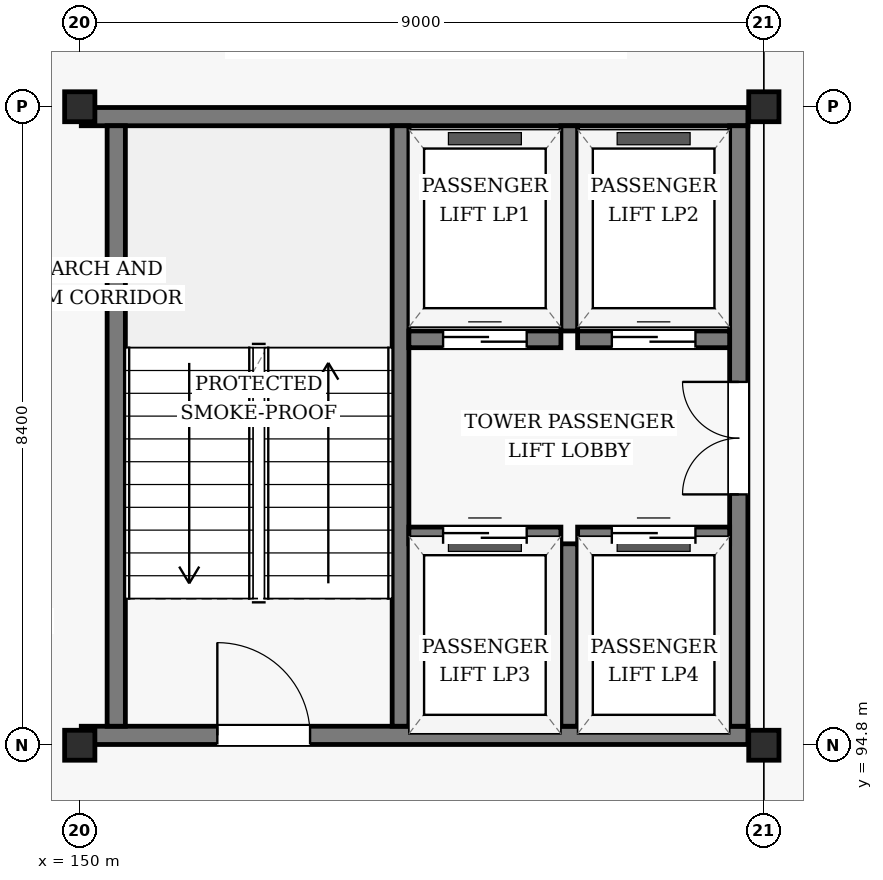
"""IFC4 building model, lengths in metres.
Left out: names, types, materials, properties, quantities, classifications, styles, units other than length and angle.
Written with IfcOpenShell. Run it as: python <this file> out.ifc"""

import sys

from ifc_helpers import new_model, si_unit, direction, frame, frame_2d, origin, origin_2d, place, context, subcontext, project, spatial, rectangle, i_section, extrude, element, fill, save


model = new_model("IFC4")
c1 = context("Model", 3, precision=1e-05, world=origin(), true_north=direction((0.0, 1.0)))
c2 = subcontext(c1, "Body", "Model", "MODEL_VIEW")
j1 = project(units=[si_unit("LENGTHUNIT", "METRE"), si_unit("PLANEANGLEUNIT", "RADIAN")], contexts=[c1])
p1 = place(None, origin())
s1 = spatial("IfcSite", under=j1, at=p1, CompositionType="ELEMENT")
p2 = place(p1, origin())
s2 = spatial("IfcBuilding", under=s1, at=p2, CompositionType="ELEMENT")
p3 = place(p2, frame((0.0, 0.0, 28.2)))
s3 = spatial("IfcBuildingStorey", under=s2, at=p3, CompositionType="ELEMENT", Elevation=28.2)
for number, where, z_axis, x_axis in (
    (1, (150.0, 94.8, 0.0), (0.0, 0.0, 1.0), (1.0, 0.0, 0.0)),
    (2, (150.0, 103.2, 0.0), (0.0, 0.0, 1.0), (1.0, 0.0, 0.0)),
    (3, (159.0, 94.8, 0.0), (0.0, 0.0, 1.0), (1.0, 0.0, 0.0)),
    (4, (159.0, 103.2, 0.0), (0.0, 0.0, 1.0), (1.0, 0.0, 0.0)),
):
    element("IfcColumn", number, at=place(p3, frame(where, z_axis=z_axis, x_axis=x_axis)), inside=s3, PredefinedType="COLUMN", context=c2, shape_type="SweptSolid", body=[
        extrude(i_section(OverallWidth=0.398, OverallDepth=0.394, WebThickness=0.011, FlangeThickness=0.018, FilletRadius=0.022, at=origin_2d()), origin(), (0.0, 0.0, 1.0), 3.6),
    ])
p4 = place(p3, frame((150.02, 94.93, 0.0), z_axis=(0.0, 0.0, 1.0), x_axis=(1.0, 0.0, 0.0)))
e5 = element("IfcWall", 5, at=p4, inside=s3, PredefinedType="SHEAR", context=c2, shape_type="SweptSolid", body=[
    extrude(rectangle(XDim=8.77, YDim=0.24, at=frame_2d((4.385, 0.0))), origin(), (0.0, 0.0, 1.0), 3.352),
])
p5 = place(p4, frame((1.79, 0.0, 0.0)))
e6 = element("IfcOpeningElement", 6, at=p5, cuts=e5, PredefinedType="OPENING", context=c2, shape_type="SweptSolid", body=[
    extrude(rectangle(XDim=1.22, YDim=2.18, at=frame_2d((0.61, 1.09))), frame((0.0, 0.13, 0.0), z_axis=(0.0, -1.0, 0.0), x_axis=(1.0, 0.0, 0.0)), (0.0, 0.0, 1.0), 0.26),
])
p6 = place(p3, frame((150.02, 103.07, 0.0), z_axis=(0.0, 0.0, 1.0), x_axis=(1.0, 0.0, 0.0)))
e7 = element("IfcWall", 7, at=p6, inside=s3, PredefinedType="SHEAR", context=c2, shape_type="SweptSolid", body=[
    extrude(rectangle(XDim=8.77, YDim=0.24, at=frame_2d((4.385, 0.0))), origin(), (0.0, 0.0, 1.0), 3.352),
])
p7 = place(p3, frame((150.48, 95.05, 0.0), z_axis=(0.0, 0.0, 1.0), x_axis=(0.0, 1.0, 0.0)))
e8 = element("IfcWall", 8, at=p7, inside=s3, PredefinedType="SHEAR", context=c2, shape_type="SweptSolid", body=[
    extrude(rectangle(XDim=7.9, YDim=0.24, at=frame_2d((3.95, 0.0))), origin(), (0.0, 0.0, 1.0), 3.352),
])
p8 = place(p3, frame((154.22, 95.05, 0.0), z_axis=(0.0, 0.0, 1.0), x_axis=(0.0, 1.0, 0.0)))
e9 = element("IfcWall", 9, at=p8, inside=s3, PredefinedType="SHEAR", context=c2, shape_type="SweptSolid", body=[
    extrude(rectangle(XDim=7.9, YDim=0.22, at=frame_2d((3.95, 0.0))), origin(), (0.0, 0.0, 1.0), 3.352),
])
p9 = place(p3, frame((158.67, 95.05, 0.0), z_axis=(0.0, 0.0, 1.0), x_axis=(0.0, 1.0, 0.0)))
e10 = element("IfcWall", 10, at=p9, inside=s3, PredefinedType="SHEAR", context=c2, shape_type="SweptSolid", body=[
    extrude(rectangle(XDim=7.9, YDim=0.24, at=frame_2d((3.95, 0.0))), origin(), (0.0, 0.0, 1.0), 3.352),
])
p10 = place(p9, frame((3.05, 0.0, 0.0)))
e11 = element("IfcOpeningElement", 11, at=p10, cuts=e10, PredefinedType="OPENING", context=c2, shape_type="SweptSolid", body=[
    extrude(rectangle(XDim=1.48, YDim=2.22, at=frame_2d((0.74, 1.11))), frame((0.0, 0.13, 0.0), z_axis=(0.0, -1.0, 0.0), x_axis=(1.0, 0.0, 0.0)), (0.0, 0.0, 1.0), 0.26),
])
p11 = place(p3, frame((156.44, 100.25, 0.0), z_axis=(0.0, 0.0, 1.0), x_axis=(0.0, 1.0, 0.0)))
e12 = element("IfcWall", 12, at=p11, inside=s3, PredefinedType="SHEAR", context=c2, shape_type="SweptSolid", body=[
    extrude(rectangle(XDim=2.7, YDim=0.22, at=frame_2d((1.35, 0.0))), origin(), (0.0, 0.0, 1.0), 3.352),
])
p12 = place(p3, frame((154.33, 100.14, 0.0), z_axis=(0.0, 0.0, 1.0), x_axis=(1.0, 0.0, 0.0)))
e13 = element("IfcWall", 13, at=p12, inside=s3, PredefinedType="SHEAR", context=c2, shape_type="SweptSolid", body=[
    extrude(rectangle(XDim=2.0, YDim=0.22, at=frame_2d((1.0, 0.0))), origin(), (0.0, 0.0, 1.0), 3.352),
])
p13 = place(p12, frame((0.45, 0.0, 0.0)))
e14 = element("IfcOpeningElement", 14, at=p13, cuts=e13, PredefinedType="OPENING", context=c2, shape_type="SweptSolid", body=[
    extrude(rectangle(XDim=1.1, YDim=2.15, at=frame_2d((0.55, 1.075))), frame((0.0, 0.12, 0.0), z_axis=(0.0, -1.0, 0.0), x_axis=(1.0, 0.0, 0.0)), (0.0, 0.0, 1.0), 0.24),
])
p14 = place(p3, frame((156.55, 100.14, 0.0), z_axis=(0.0, 0.0, 1.0), x_axis=(1.0, 0.0, 0.0)))
e15 = element("IfcWall", 15, at=p14, inside=s3, PredefinedType="SHEAR", context=c2, shape_type="SweptSolid", body=[
    extrude(rectangle(XDim=2.0, YDim=0.22, at=frame_2d((1.0, 0.0))), origin(), (0.0, 0.0, 1.0), 3.352),
])
p15 = place(p14, frame((0.45, 0.0, 0.0)))
e16 = element("IfcOpeningElement", 16, at=p15, cuts=e15, PredefinedType="OPENING", context=c2, shape_type="SweptSolid", body=[
    extrude(rectangle(XDim=1.1, YDim=2.15, at=frame_2d((0.55, 1.075))), frame((0.0, 0.12, 0.0), z_axis=(0.0, -1.0, 0.0), x_axis=(1.0, 0.0, 0.0)), (0.0, 0.0, 1.0), 0.24),
])
p16 = place(p3, frame((156.44, 95.05, 0.0), z_axis=(0.0, 0.0, 1.0), x_axis=(0.0, 1.0, 0.0)))
e17 = element("IfcWall", 17, at=p16, inside=s3, PredefinedType="SHEAR", context=c2, shape_type="SweptSolid", body=[
    extrude(rectangle(XDim=2.4, YDim=0.22, at=frame_2d((1.2, 0.0))), origin(), (0.0, 0.0, 1.0), 3.352),
])
p17 = place(p3, frame((154.33, 97.56, 0.0), z_axis=(0.0, 0.0, 1.0), x_axis=(1.0, 0.0, 0.0)))
e18 = element("IfcWall", 18, at=p17, inside=s3, PredefinedType="SHEAR", context=c2, shape_type="SweptSolid", body=[
    extrude(rectangle(XDim=2.0, YDim=0.22, at=frame_2d((1.0, 0.0))), origin(), (0.0, 0.0, 1.0), 3.352),
])
p18 = place(p17, frame((0.45, 0.0, 0.0)))
e19 = element("IfcOpeningElement", 19, at=p18, cuts=e18, PredefinedType="OPENING", context=c2, shape_type="SweptSolid", body=[
    extrude(rectangle(XDim=1.1, YDim=2.15, at=frame_2d((0.55, 1.075))), frame((0.0, 0.12, 0.0), z_axis=(0.0, -1.0, 0.0), x_axis=(1.0, 0.0, 0.0)), (0.0, 0.0, 1.0), 0.24),
])
p19 = place(p3, frame((156.55, 97.56, 0.0), z_axis=(0.0, 0.0, 1.0), x_axis=(1.0, 0.0, 0.0)))
e20 = element("IfcWall", 20, at=p19, inside=s3, PredefinedType="SHEAR", context=c2, shape_type="SweptSolid", body=[
    extrude(rectangle(XDim=2.0, YDim=0.22, at=frame_2d((1.0, 0.0))), origin(), (0.0, 0.0, 1.0), 3.352),
])
p20 = place(p19, frame((0.45, 0.0, 0.0)))
e21 = element("IfcOpeningElement", 21, at=p20, cuts=e20, PredefinedType="OPENING", context=c2, shape_type="SweptSolid", body=[
    extrude(rectangle(XDim=1.1, YDim=2.15, at=frame_2d((0.55, 1.075))), frame((0.0, 0.12, 0.0), z_axis=(0.0, -1.0, 0.0), x_axis=(1.0, 0.0, 0.0)), (0.0, 0.0, 1.0), 0.24),
])
p21 = place(p5, origin())
e22 = element("IfcDoor", 22, at=p21, inside=s3, OperationType="SINGLE_SWING_LEFT", PredefinedType="DOOR", context=c2, shape_type="SweptSolid", body=[
    extrude(rectangle(XDim=1.22, YDim=2.18, at=frame_2d((0.61, 1.09))), frame((0.0, 0.025, 0.0), z_axis=(0.0, -1.0, 0.0), x_axis=(1.0, 0.0, 0.0)), (0.0, 0.0, 1.0), 0.05),
])
fill(e6, e22)
p22 = place(p10, origin())
e23 = element("IfcDoor", 23, at=p22, inside=s3, OperationType="DOUBLE_DOOR_SINGLE_SWING", PredefinedType="DOOR", context=c2, shape_type="SweptSolid", body=[
    extrude(rectangle(XDim=1.48, YDim=2.22, at=frame_2d((0.74, 1.11))), frame((0.0, 0.025, 0.0), z_axis=(0.0, -1.0, 0.0), x_axis=(1.0, 0.0, 0.0)), (0.0, 0.0, 1.0), 0.05),
])
fill(e11, e23)
p23 = place(p13, origin())
e24 = element("IfcDoor", 24, at=p23, inside=s3, OperationType="SLIDING_TO_LEFT", PredefinedType="DOOR", context=c2, shape_type="SweptSolid", body=[
    extrude(rectangle(XDim=1.1, YDim=2.15, at=frame_2d((0.55, 1.075))), frame((0.0, 0.025, 0.0), z_axis=(0.0, -1.0, 0.0), x_axis=(1.0, 0.0, 0.0)), (0.0, 0.0, 1.0), 0.05),
])
fill(e14, e24)
p24 = place(p15, origin())
e25 = element("IfcDoor", 25, at=p24, inside=s3, OperationType="SLIDING_TO_LEFT", PredefinedType="DOOR", context=c2, shape_type="SweptSolid", body=[
    extrude(rectangle(XDim=1.1, YDim=2.15, at=frame_2d((0.55, 1.075))), frame((0.0, 0.025, 0.0), z_axis=(0.0, -1.0, 0.0), x_axis=(1.0, 0.0, 0.0)), (0.0, 0.0, 1.0), 0.05),
])
fill(e16, e25)
p25 = place(p18, origin())
e26 = element("IfcDoor", 26, at=p25, inside=s3, OperationType="SLIDING_TO_LEFT", PredefinedType="DOOR", context=c2, shape_type="SweptSolid", body=[
    extrude(rectangle(XDim=1.1, YDim=2.15, at=frame_2d((0.55, 1.075))), frame((0.0, 0.025, 0.0), z_axis=(0.0, -1.0, 0.0), x_axis=(1.0, 0.0, 0.0)), (0.0, 0.0, 1.0), 0.05),
])
fill(e19, e26)
p26 = place(p20, origin())
e27 = element("IfcDoor", 27, at=p26, inside=s3, OperationType="SLIDING_TO_LEFT", PredefinedType="DOOR", context=c2, shape_type="SweptSolid", body=[
    extrude(rectangle(XDim=1.1, YDim=2.15, at=frame_2d((0.55, 1.075))), frame((0.0, 0.025, 0.0), z_axis=(0.0, -1.0, 0.0), x_axis=(1.0, 0.0, 0.0)), (0.0, 0.0, 1.0), 0.05),
])
fill(e21, e27)
save(model, sys.argv[1])
